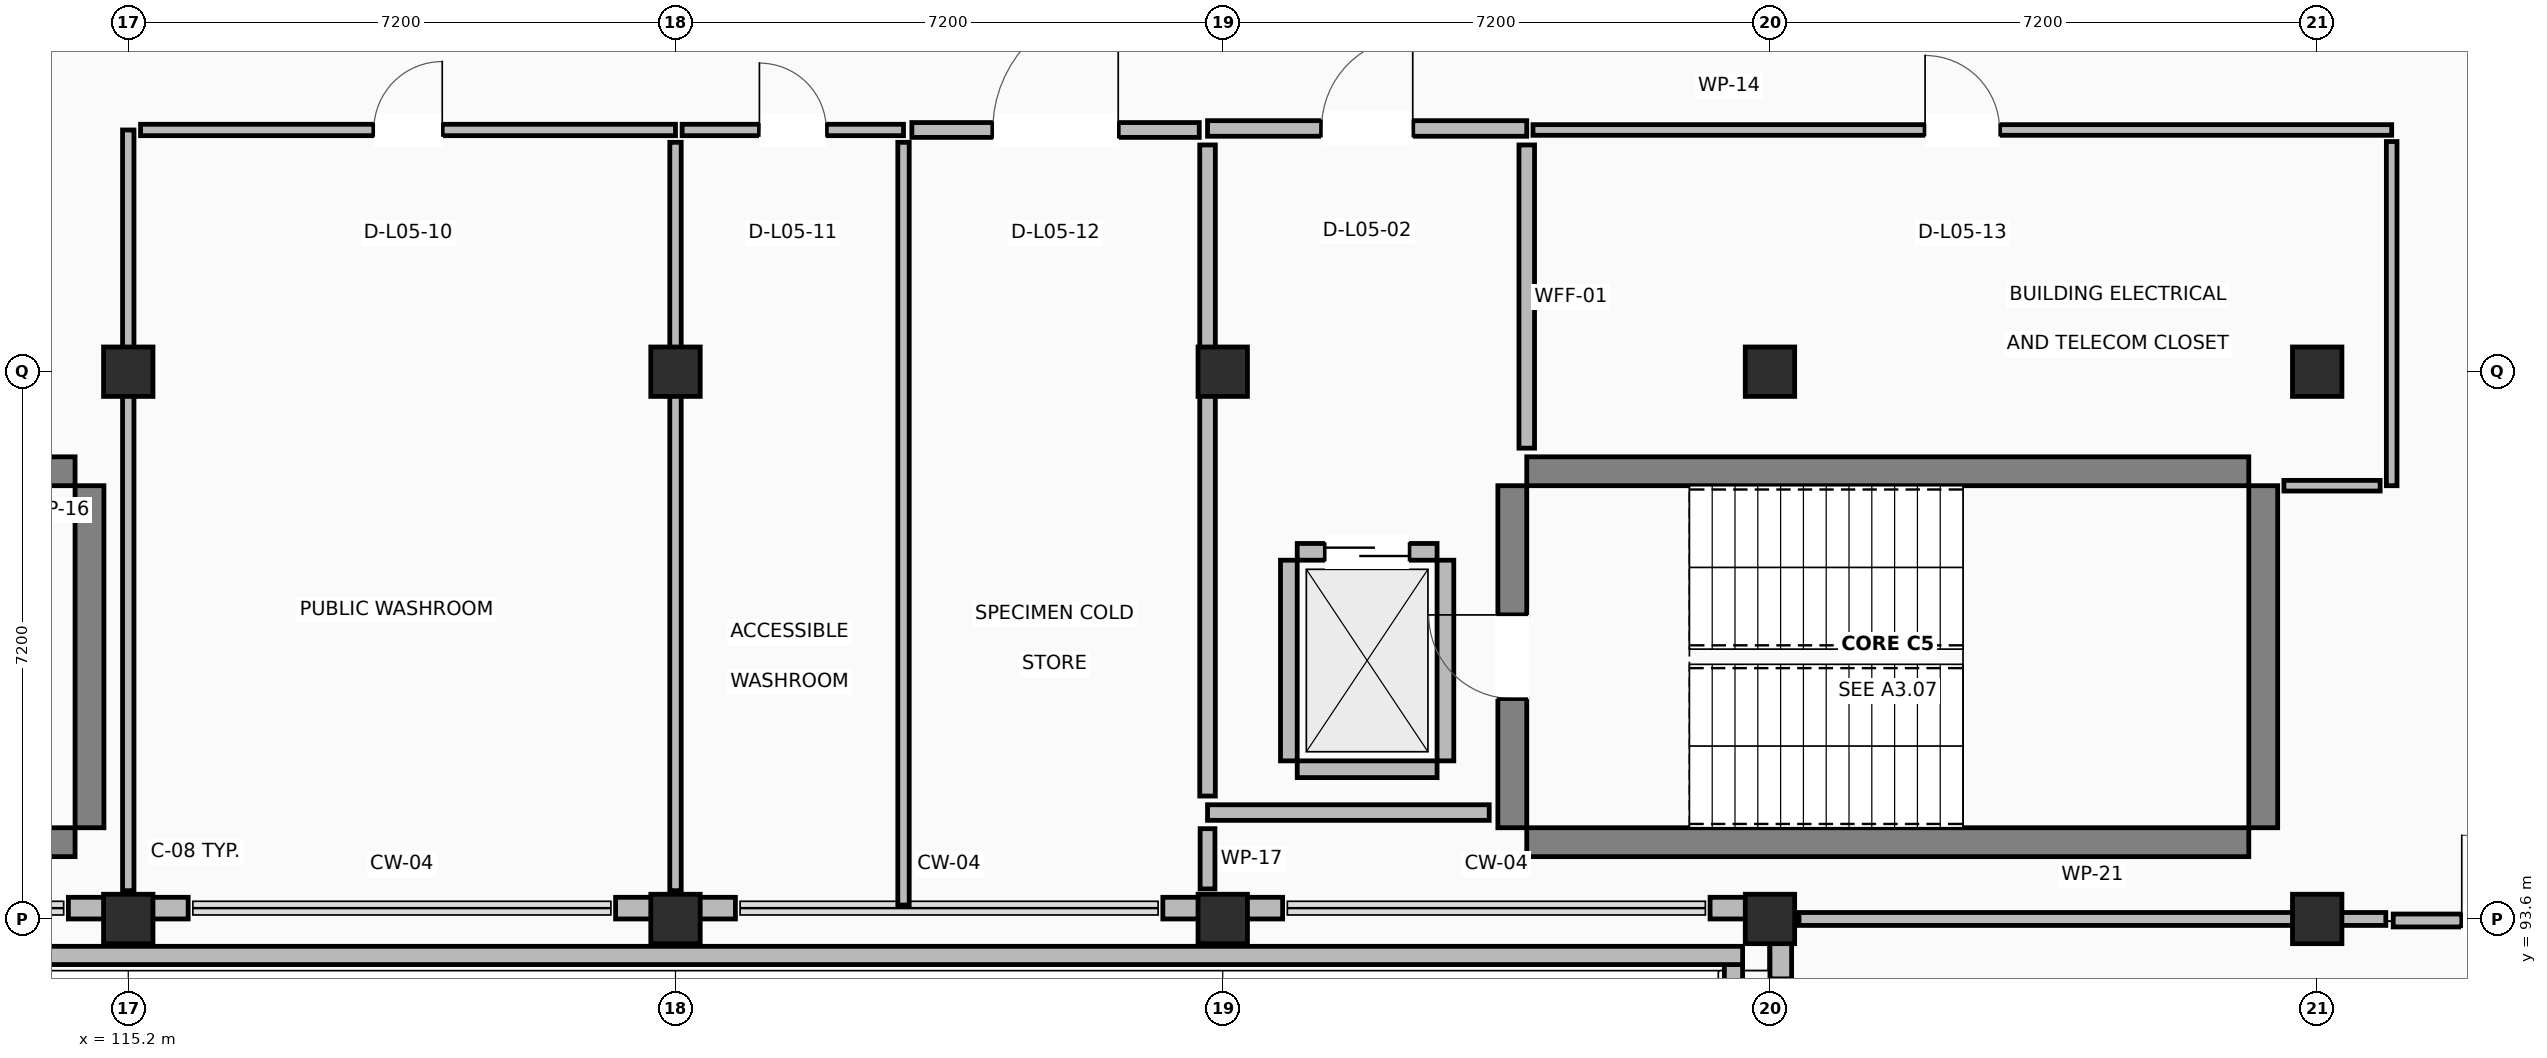
"""IFC4 building model, lengths in metres.
Left out: names, types, materials, properties, quantities, classifications, styles, units other than length and angle.
Written with IfcOpenShell. Run it as: python <this file> out.ifc"""

import sys

from ifc_helpers import new_model, si_unit, direction, frame, frame_2d, origin, origin_2d, place, context, subcontext, project, spatial, rectangle, extrude, element, fill, save


model = new_model("IFC4")
c1 = context("Model", 3, precision=1e-05, world=origin(), true_north=direction((0.0, 1.0)))
c2 = subcontext(c1, "Body", "Model", "MODEL_VIEW")
j1 = project(units=[si_unit("LENGTHUNIT", "METRE"), si_unit("PLANEANGLEUNIT", "RADIAN")], contexts=[c1])
p1 = place(None, origin())
s1 = spatial("IfcSite", under=j1, at=p1, CompositionType="ELEMENT")
p2 = place(p1, origin())
s2 = spatial("IfcBuilding", under=s1, at=p2, CompositionType="ELEMENT")
p3 = place(p2, frame((0.0, 0.0, 22.5)))
s3 = spatial("IfcBuildingStorey", under=s2, at=p3, CompositionType="ELEMENT", Elevation=22.5)
for number, where, z_axis, x_axis in (
    (1, (115.2, 93.6, 0.0), (0.0, 0.0, 1.0), (1.0, 0.0, 0.0)),
    (2, (115.2, 100.8, 0.0), (0.0, 0.0, 1.0), (1.0, 0.0, 0.0)),
    (3, (122.4, 93.6, 0.0), (0.0, 0.0, 1.0), (1.0, 0.0, 0.0)),
    (4, (122.4, 100.8, 0.0), (0.0, 0.0, 1.0), (1.0, 0.0, 0.0)),
    (5, (129.6, 93.6, 0.0), (0.0, 0.0, 1.0), (1.0, 0.0, 0.0)),
    (6, (129.6, 100.8, 0.0), (0.0, 0.0, 1.0), (1.0, 0.0, 0.0)),
    (7, (136.8, 93.6, 0.0), (0.0, 0.0, 1.0), (1.0, 0.0, 0.0)),
    (8, (136.8, 100.8, 0.0), (0.0, 0.0, 1.0), (1.0, 0.0, 0.0)),
    (9, (144.0, 93.6, 0.0), (0.0, 0.0, 1.0), (1.0, 0.0, 0.0)),
    (10, (144.0, 100.8, 0.0), (0.0, 0.0, 1.0), (1.0, 0.0, 0.0)),
):
    element("IfcColumn", number, at=place(p3, frame(where, z_axis=z_axis, x_axis=x_axis)), inside=s3, PredefinedType="COLUMN", context=c2, shape_type="SweptSolid", body=[
        extrude(rectangle(XDim=0.65, YDim=0.65, at=origin_2d()), origin(), (0.0, 0.0, 1.0), 4.22),
    ])
for number, where, z_axis, x_axis in (
    (11, (105.0, 94.61, 0.0), (0.0, 0.0, 1.0), (1.0, 0.0, 0.0)),
    (12, (105.0, 99.49, 0.0), (0.0, 0.0, 1.0), (1.0, 0.0, 0.0)),
):
    element("IfcWall", number, at=place(p3, frame(where, z_axis=z_axis, x_axis=x_axis)), inside=s3, PredefinedType="SHEAR", context=c2, shape_type="SweptSolid", body=[
        extrude(rectangle(XDim=9.5, YDim=0.38, at=frame_2d((4.75, 0.0))), origin(), (0.0, 0.0, 1.0), 4.22),
    ])
p4 = place(p3, frame((114.69, 94.8, 0.0), z_axis=(0.0, 0.0, 1.0), x_axis=(0.0, 1.0, 0.0)))
e13 = element("IfcWall", 13, at=p4, inside=s3, PredefinedType="SHEAR", context=c2, shape_type="SweptSolid", body=[
    extrude(rectangle(XDim=4.5, YDim=0.38, at=frame_2d((2.25, 0.0))), origin(), (0.0, 0.0, 1.0), 4.22),
])
for number, where, z_axis, x_axis in (
    (14, (133.6, 94.61, 0.0), (0.0, 0.0, 1.0), (1.0, 0.0, 0.0)),
    (15, (133.6, 99.49, 0.0), (0.0, 0.0, 1.0), (1.0, 0.0, 0.0)),
):
    element("IfcWall", number, at=place(p3, frame(where, z_axis=z_axis, x_axis=x_axis)), inside=s3, PredefinedType="SHEAR", context=c2, shape_type="SweptSolid", body=[
        extrude(rectangle(XDim=9.5, YDim=0.38, at=frame_2d((4.75, 0.0))), origin(), (0.0, 0.0, 1.0), 4.22),
    ])
p5 = place(p3, frame((133.41, 94.8, 0.0), z_axis=(0.0, 0.0, 1.0), x_axis=(0.0, 1.0, 0.0)))
e16 = element("IfcWall", 16, at=p5, inside=s3, PredefinedType="SHEAR", context=c2, shape_type="SweptSolid", body=[
    extrude(rectangle(XDim=4.5, YDim=0.38, at=frame_2d((2.25, 0.0))), origin(), (0.0, 0.0, 1.0), 4.22),
])
p6 = place(p5, frame((1.7, 0.0, 0.0)))
e17 = element("IfcOpeningElement", 17, at=p6, cuts=e16, PredefinedType="OPENING", context=c2, shape_type="SweptSolid", body=[
    extrude(rectangle(XDim=1.1, YDim=2.15, at=frame_2d((0.55, 1.075))), frame((0.0, 0.2, 0.0), z_axis=(0.0, -1.0, 0.0), x_axis=(1.0, 0.0, 0.0)), (0.0, 0.0, 1.0), 0.4),
])
p7 = place(p3, frame((143.29, 94.8, 0.0), z_axis=(0.0, 0.0, 1.0), x_axis=(0.0, 1.0, 0.0)))
e18 = element("IfcWall", 18, at=p7, inside=s3, PredefinedType="SHEAR", context=c2, shape_type="SweptSolid", body=[
    extrude(rectangle(XDim=4.5, YDim=0.38, at=frame_2d((2.25, 0.0))), origin(), (0.0, 0.0, 1.0), 4.22),
])
for number, where, z_axis, x_axis in (
    (19, (114.412, 93.742, 0.0), (0.0, 0.0, 1.0), (1.0, 0.0, 0.0)),
    (20, (121.612, 93.742, 0.0), (0.0, 0.0, 1.0), (1.0, 0.0, 0.0)),
    (21, (128.812, 93.742, 0.0), (0.0, 0.0, 1.0), (1.0, 0.0, 0.0)),
):
    element("IfcWall", number, at=place(p3, frame(where, z_axis=z_axis, x_axis=x_axis)), inside=s3, PredefinedType="STANDARD", context=c2, shape_type="SweptSolid", body=[
        extrude(rectangle(XDim=1.576, YDim=0.285, at=frame_2d((0.788, 0.0))), origin(), (0.0, 0.0, 1.0), 3.26),
    ])
p8 = place(p3, frame((136.012, 93.742, 0.0), z_axis=(0.0, 0.0, 1.0), x_axis=(1.0, 0.0, 0.0)))
e22 = element("IfcWall", 22, at=p8, inside=s3, PredefinedType="STANDARD", context=c2, shape_type="SweptSolid", body=[
    extrude(rectangle(XDim=0.788, YDim=0.285, at=frame_2d((0.394, 0.0))), origin(), (0.0, 0.0, 1.0), 3.26),
])
p9 = place(p3, frame((136.942, 93.885, 0.0), z_axis=(0.0, 0.0, 1.0), x_axis=(0.0, -1.0, 0.0)))
e23 = element("IfcWall", 23, at=p9, inside=s3, PredefinedType="STANDARD", context=c2, shape_type="SweptSolid", body=[
    extrude(rectangle(XDim=1.073, YDim=0.285, at=frame_2d((0.537, 0.0))), origin(), (0.0, 0.0, 1.0), 3.26),
])
p10 = place(p3, frame((136.32, 86.04, 0.0), z_axis=(0.0, 0.0, 1.0), x_axis=(0.0, 1.0, 0.0)))
e24 = element("IfcWall", 24, at=p10, inside=s3, PredefinedType="PARAPET", context=c2, shape_type="SweptSolid", body=[
    extrude(rectangle(XDim=6.96, YDim=0.24, at=frame_2d((3.48, 0.0))), origin(), (0.0, 0.0, 1.0), 1.12),
])
p11 = place(p3, frame((136.44, 93.12, 0.0), z_axis=(0.0, 0.0, 1.0), x_axis=(-1.0, 0.0, 0.0)))
e25 = element("IfcWall", 25, at=p11, inside=s3, PredefinedType="PARAPET", context=c2, shape_type="SweptSolid", body=[
    extrude(rectangle(XDim=57.84, YDim=0.24, at=frame_2d((28.92, 0.0))), origin(), (0.0, 0.0, 1.0), 1.12),
])
p12 = place(p3, frame((130.58, 95.57, 0.0), z_axis=(0.0, 0.0, 1.0), x_axis=(1.0, 0.0, 0.0)))
e26 = element("IfcWall", 26, at=p12, inside=s3, PredefinedType="STANDARD", context=c2, shape_type="SweptSolid", body=[
    extrude(rectangle(XDim=1.84, YDim=0.22, at=frame_2d((0.92, 0.0))), origin(), (0.0, 0.0, 1.0), 3.26),
])
p13 = place(p3, frame((130.58, 98.43, 0.0), z_axis=(0.0, 0.0, 1.0), x_axis=(1.0, 0.0, 0.0)))
e27 = element("IfcWall", 27, at=p13, inside=s3, PredefinedType="STANDARD", context=c2, shape_type="SweptSolid", body=[
    extrude(rectangle(XDim=1.84, YDim=0.22, at=frame_2d((0.92, 0.0))), origin(), (0.0, 0.0, 1.0), 3.26),
])
p14 = place(p13, frame((0.37, 0.0, 0.0)))
e28 = element("IfcOpeningElement", 28, at=p14, cuts=e27, PredefinedType="OPENING", context=c2, shape_type="SweptSolid", body=[
    extrude(rectangle(XDim=1.1, YDim=2.15, at=frame_2d((0.55, 1.075))), frame((0.0, 0.12, 0.0), z_axis=(0.0, -1.0, 0.0), x_axis=(1.0, 0.0, 0.0)), (0.0, 0.0, 1.0), 0.24),
])
for number, where, z_axis, x_axis in (
    (29, (130.47, 95.68, 0.0), (0.0, 0.0, 1.0), (0.0, 1.0, 0.0)),
    (30, (132.53, 95.68, 0.0), (0.0, 0.0, 1.0), (0.0, 1.0, 0.0)),
):
    element("IfcWall", number, at=place(p3, frame(where, z_axis=z_axis, x_axis=x_axis)), inside=s3, PredefinedType="STANDARD", context=c2, shape_type="SweptSolid", body=[
        extrude(rectangle(XDim=2.64, YDim=0.22, at=frame_2d((1.32, 0.0))), origin(), (0.0, 0.0, 1.0), 3.26),
    ])
p15 = place(p3, frame((129.4, 104.0, 0.0), z_axis=(0.0, 0.0, 1.0), x_axis=(1.0, 0.0, 0.0)))
e31 = element("IfcWall", 31, at=p15, inside=s3, PredefinedType="PARTITIONING", context=c2, shape_type="SweptSolid", body=[
    extrude(rectangle(XDim=4.2, YDim=0.205, at=frame_2d((2.1, 0.0))), origin(), (0.0, 0.0, 1.0), 3.26),
])
p16 = place(p15, frame((1.5, 0.0, 0.0)))
e32 = element("IfcOpeningElement", 32, at=p16, cuts=e31, PredefinedType="OPENING", context=c2, shape_type="SweptSolid", body=[
    extrude(rectangle(XDim=1.2, YDim=2.15, at=frame_2d((0.6, 1.075))), frame((0.0, 0.113, 0.0), z_axis=(0.0, -1.0, 0.0), x_axis=(1.0, 0.0, 0.0)), (0.0, 0.0, 1.0), 0.225),
])
p17 = place(p3, frame((133.6, 103.783, 0.0), z_axis=(0.0, 0.0, 1.0), x_axis=(0.0, -1.0, 0.0)))
e33 = element("IfcWall", 33, at=p17, inside=s3, PredefinedType="PARTITIONING", context=c2, shape_type="SweptSolid", body=[
    extrude(rectangle(XDim=3.989, YDim=0.205, at=frame_2d((1.995, 0.0))), origin(), (0.0, 0.0, 1.0), 3.26),
])
p18 = place(p3, frame((133.106, 95.0, 0.0), z_axis=(0.0, 0.0, 1.0), x_axis=(-1.0, 0.0, 0.0)))
e34 = element("IfcWall", 34, at=p18, inside=s3, PredefinedType="PARTITIONING", context=c2, shape_type="SweptSolid", body=[
    extrude(rectangle(XDim=3.706, YDim=0.205, at=frame_2d((1.853, 0.0))), origin(), (0.0, 0.0, 1.0), 3.26),
])
p19 = place(p3, frame((129.4, 95.217, 0.0), z_axis=(0.0, 0.0, 1.0), x_axis=(0.0, 1.0, 0.0)))
e35 = element("IfcWall", 35, at=p19, inside=s3, PredefinedType="PARTITIONING", context=c2, shape_type="SweptSolid", body=[
    extrude(rectangle(XDim=8.566, YDim=0.205, at=frame_2d((4.283, 0.0))), origin(), (0.0, 0.0, 1.0), 3.26),
])
p20 = place(p3, frame((115.2, 93.972, 0.0), z_axis=(0.0, 0.0, 1.0), x_axis=(0.0, 1.0, 0.0)))
e36 = element("IfcWall", 36, at=p20, inside=s3, PredefinedType="PARTITIONING", context=c2, shape_type="SweptSolid", body=[
    extrude(rectangle(XDim=10.008, YDim=0.15, at=frame_2d((5.004, 0.0))), origin(), (0.0, 0.0, 1.0), 3.26),
])
p21 = place(p3, frame((115.362, 103.98, 0.0), z_axis=(0.0, 0.0, 1.0), x_axis=(1.0, 0.0, 0.0)))
e37 = element("IfcWall", 37, at=p21, inside=s3, PredefinedType="PARTITIONING", context=c2, shape_type="SweptSolid", body=[
    extrude(rectangle(XDim=7.038, YDim=0.15, at=frame_2d((3.519, 0.0))), origin(), (0.0, 0.0, 1.0), 3.26),
])
p22 = place(p21, frame((3.069, 0.0, 0.0)))
e38 = element("IfcOpeningElement", 38, at=p22, cuts=e37, PredefinedType="OPENING", context=c2, shape_type="SweptSolid", body=[
    extrude(rectangle(XDim=0.9, YDim=2.1, at=frame_2d((0.45, 1.05))), frame((0.0, 0.085, 0.0), z_axis=(0.0, -1.0, 0.0), x_axis=(1.0, 0.0, 0.0)), (0.0, 0.0, 1.0), 0.17),
])
p23 = place(p3, frame((122.4, 103.818, 0.0), z_axis=(0.0, 0.0, 1.0), x_axis=(0.0, -1.0, 0.0)))
e39 = element("IfcWall", 39, at=p23, inside=s3, PredefinedType="PARTITIONING", context=c2, shape_type="SweptSolid", body=[
    extrude(rectangle(XDim=9.846, YDim=0.15, at=frame_2d((4.923, 0.0))), origin(), (0.0, 0.0, 1.0), 3.26),
])
p24 = place(p3, frame((122.487, 103.98, 0.0), z_axis=(0.0, 0.0, 1.0), x_axis=(1.0, 0.0, 0.0)))
e40 = element("IfcWall", 40, at=p24, inside=s3, PredefinedType="PARTITIONING", context=c2, shape_type="SweptSolid", body=[
    extrude(rectangle(XDim=2.913, YDim=0.15, at=frame_2d((1.457, 0.0))), origin(), (0.0, 0.0, 1.0), 3.26),
])
p25 = place(p24, frame((1.017, 0.0, 0.0)))
e41 = element("IfcOpeningElement", 41, at=p25, cuts=e40, PredefinedType="OPENING", context=c2, shape_type="SweptSolid", body=[
    extrude(rectangle(XDim=0.88, YDim=2.1, at=frame_2d((0.44, 1.05))), frame((0.0, 0.085, 0.0), z_axis=(0.0, -1.0, 0.0), x_axis=(1.0, 0.0, 0.0)), (0.0, 0.0, 1.0), 0.17),
])
p26 = place(p3, frame((125.4, 103.818, 0.0), z_axis=(0.0, 0.0, 1.0), x_axis=(0.0, -1.0, 0.0)))
e42 = element("IfcWall", 42, at=p26, inside=s3, PredefinedType="PARTITIONING", context=c2, shape_type="SweptSolid", body=[
    extrude(rectangle(XDim=10.035, YDim=0.15, at=frame_2d((5.018, 0.0))), origin(), (0.0, 0.0, 1.0), 3.26),
])
p27 = place(p3, frame((125.51, 103.98, 0.0), z_axis=(0.0, 0.0, 1.0), x_axis=(1.0, 0.0, 0.0)))
e43 = element("IfcWall", 43, at=p27, inside=s3, PredefinedType="PARTITIONING", context=c2, shape_type="SweptSolid", body=[
    extrude(rectangle(XDim=3.781, YDim=0.195, at=frame_2d((1.891, 0.0))), origin(), (0.0, 0.0, 1.0), 3.26),
])
p28 = place(p27, frame((1.065, 0.0, 0.0)))
e44 = element("IfcOpeningElement", 44, at=p28, cuts=e43, PredefinedType="OPENING", context=c2, shape_type="SweptSolid", body=[
    extrude(rectangle(XDim=1.65, YDim=2.2, at=frame_2d((0.825, 1.1))), frame((0.0, 0.107, 0.0), z_axis=(0.0, -1.0, 0.0), x_axis=(1.0, 0.0, 0.0)), (0.0, 0.0, 1.0), 0.215),
])
p29 = place(p3, frame((129.4, 94.788, 0.0), z_axis=(0.0, 0.0, 1.0), x_axis=(0.0, -1.0, 0.0)))
e45 = element("IfcWall", 45, at=p29, inside=s3, PredefinedType="PARTITIONING", context=c2, shape_type="SweptSolid", body=[
    extrude(rectangle(XDim=0.793, YDim=0.195, at=frame_2d((0.396, 0.0))), origin(), (0.0, 0.0, 1.0), 3.26),
])
p30 = place(p3, frame((133.682, 103.98, 0.0), z_axis=(0.0, 0.0, 1.0), x_axis=(1.0, 0.0, 0.0)))
e46 = element("IfcWall", 46, at=p30, inside=s3, PredefinedType="PARTITIONING", context=c2, shape_type="SweptSolid", body=[
    extrude(rectangle(XDim=11.298, YDim=0.14, at=frame_2d((5.649, 0.0))), origin(), (0.0, 0.0, 1.0), 3.26),
])
p31 = place(p30, frame((5.159, 0.0, 0.0)))
e47 = element("IfcOpeningElement", 47, at=p31, cuts=e46, PredefinedType="OPENING", context=c2, shape_type="SweptSolid", body=[
    extrude(rectangle(XDim=0.98, YDim=2.1, at=frame_2d((0.49, 1.05))), frame((0.0, 0.08, 0.0), z_axis=(0.0, -1.0, 0.0), x_axis=(1.0, 0.0, 0.0)), (0.0, 0.0, 1.0), 0.16),
])
p32 = place(p3, frame((144.98, 103.828, 0.0), z_axis=(0.0, 0.0, 1.0), x_axis=(0.0, -1.0, 0.0)))
e48 = element("IfcWall", 48, at=p32, inside=s3, PredefinedType="PARTITIONING", context=c2, shape_type="SweptSolid", body=[
    extrude(rectangle(XDim=4.528, YDim=0.14, at=frame_2d((2.264, 0.0))), origin(), (0.0, 0.0, 1.0), 3.26),
])
p33 = place(p3, frame((144.828, 99.3, 0.0), z_axis=(0.0, 0.0, 1.0), x_axis=(-1.0, 0.0, 0.0)))
e49 = element("IfcWall", 49, at=p33, inside=s3, PredefinedType="PARTITIONING", context=c2, shape_type="SweptSolid", body=[
    extrude(rectangle(XDim=1.266, YDim=0.14, at=frame_2d((0.633, 0.0))), origin(), (0.0, 0.0, 1.0), 3.26),
])
p34 = place(p3, frame((145.0, 93.58, 0.0), z_axis=(0.0, 0.0, 1.0), x_axis=(1.0, 0.0, 0.0)))
e50 = element("IfcWall", 50, at=p34, inside=s3, PredefinedType="PARTITIONING", context=c2, shape_type="SweptSolid", body=[
    extrude(rectangle(XDim=2.923, YDim=0.17, at=frame_2d((1.461, 0.0))), origin(), (0.0, 0.0, 1.0), 3.26),
])
p35 = place(p34, frame((0.902, 0.0, 0.0)))
e51 = element("IfcOpeningElement", 51, at=p35, cuts=e50, PredefinedType="OPENING", context=c2, shape_type="SweptSolid", body=[
    extrude(rectangle(XDim=1.12, YDim=2.15, at=frame_2d((0.56, 1.075))), frame((0.0, 0.095, 0.0), z_axis=(0.0, -1.0, 0.0), x_axis=(1.0, 0.0, 0.0)), (0.0, 0.0, 1.0), 0.19),
])
p36 = place(p3, frame((137.182, 93.6, 0.0), z_axis=(0.0, 0.0, 1.0), x_axis=(1.0, 0.0, 0.0)))
e52 = element("IfcWall", 52, at=p36, inside=s3, PredefinedType="PARTITIONING", context=c2, shape_type="SweptSolid", body=[
    extrude(rectangle(XDim=7.721, YDim=0.17, at=frame_2d((3.861, 0.0))), origin(), (0.0, 0.0, 1.0), 3.26),
])
p37 = place(p6, origin())
e53 = element("IfcDoor", 53, at=p37, inside=s3, OperationType="SINGLE_SWING_RIGHT", PredefinedType="DOOR", context=c2, shape_type="SweptSolid", body=[
    extrude(rectangle(XDim=1.1, YDim=2.15, at=frame_2d((0.55, 1.075))), frame((0.0, 0.025, 0.0), z_axis=(0.0, -1.0, 0.0), x_axis=(1.0, 0.0, 0.0)), (0.0, 0.0, 1.0), 0.05),
])
fill(e17, e53)
p38 = place(p14, origin())
e54 = element("IfcDoor", 54, at=p38, inside=s3, OperationType="SLIDING_TO_RIGHT", PredefinedType="DOOR", context=c2, shape_type="SweptSolid", body=[
    extrude(rectangle(XDim=1.1, YDim=2.15, at=frame_2d((0.55, 1.075))), frame((0.0, 0.025, 0.0), z_axis=(0.0, -1.0, 0.0), x_axis=(1.0, 0.0, 0.0)), (0.0, 0.0, 1.0), 0.05),
])
fill(e28, e54)
p39 = place(p16, origin())
e55 = element("IfcDoor", 55, at=p39, inside=s3, OperationType="SINGLE_SWING_RIGHT", PredefinedType="DOOR", context=c2, shape_type="SweptSolid", body=[
    extrude(rectangle(XDim=1.2, YDim=2.15, at=frame_2d((0.6, 1.075))), frame((0.0, 0.025, 0.0), z_axis=(0.0, -1.0, 0.0), x_axis=(1.0, 0.0, 0.0)), (0.0, 0.0, 1.0), 0.05),
])
fill(e32, e55)
p40 = place(p22, origin())
e56 = element("IfcDoor", 56, at=p40, inside=s3, OperationType="SINGLE_SWING_RIGHT", PredefinedType="DOOR", context=c2, shape_type="SweptSolid", body=[
    extrude(rectangle(XDim=0.9, YDim=2.1, at=frame_2d((0.45, 1.05))), frame((0.0, 0.025, 0.0), z_axis=(0.0, -1.0, 0.0), x_axis=(1.0, 0.0, 0.0)), (0.0, 0.0, 1.0), 0.05),
])
fill(e38, e56)
p41 = place(p25, origin())
e57 = element("IfcDoor", 57, at=p41, inside=s3, OperationType="SINGLE_SWING_LEFT", PredefinedType="DOOR", context=c2, shape_type="SweptSolid", body=[
    extrude(rectangle(XDim=0.88, YDim=2.1, at=frame_2d((0.44, 1.05))), frame((0.0, 0.025, 0.0), z_axis=(0.0, -1.0, 0.0), x_axis=(1.0, 0.0, 0.0)), (0.0, 0.0, 1.0), 0.05),
])
fill(e41, e57)
p42 = place(p28, origin())
e58 = element("IfcDoor", 58, at=p42, inside=s3, OperationType="SINGLE_SWING_RIGHT", PredefinedType="DOOR", context=c2, shape_type="SweptSolid", body=[
    extrude(rectangle(XDim=1.65, YDim=2.2, at=frame_2d((0.825, 1.1))), frame((0.0, 0.025, 0.0), z_axis=(0.0, -1.0, 0.0), x_axis=(1.0, 0.0, 0.0)), (0.0, 0.0, 1.0), 0.05),
])
fill(e44, e58)
p43 = place(p31, origin())
e59 = element("IfcDoor", 59, at=p43, inside=s3, OperationType="SINGLE_SWING_LEFT", PredefinedType="DOOR", context=c2, shape_type="SweptSolid", body=[
    extrude(rectangle(XDim=0.98, YDim=2.1, at=frame_2d((0.49, 1.05))), frame((0.0, 0.025, 0.0), z_axis=(0.0, -1.0, 0.0), x_axis=(1.0, 0.0, 0.0)), (0.0, 0.0, 1.0), 0.05),
])
fill(e47, e59)
p44 = place(p35, origin())
e60 = element("IfcDoor", 60, at=p44, inside=s3, OperationType="SINGLE_SWING_LEFT", PredefinedType="DOOR", context=c2, shape_type="SweptSolid", body=[
    extrude(rectangle(XDim=1.12, YDim=2.15, at=frame_2d((0.56, 1.075))), frame((0.0, 0.025, 0.0), z_axis=(0.0, -1.0, 0.0), x_axis=(1.0, 0.0, 0.0)), (0.0, 0.0, 1.0), 0.05),
])
fill(e51, e60)
save(model, sys.argv[1])
